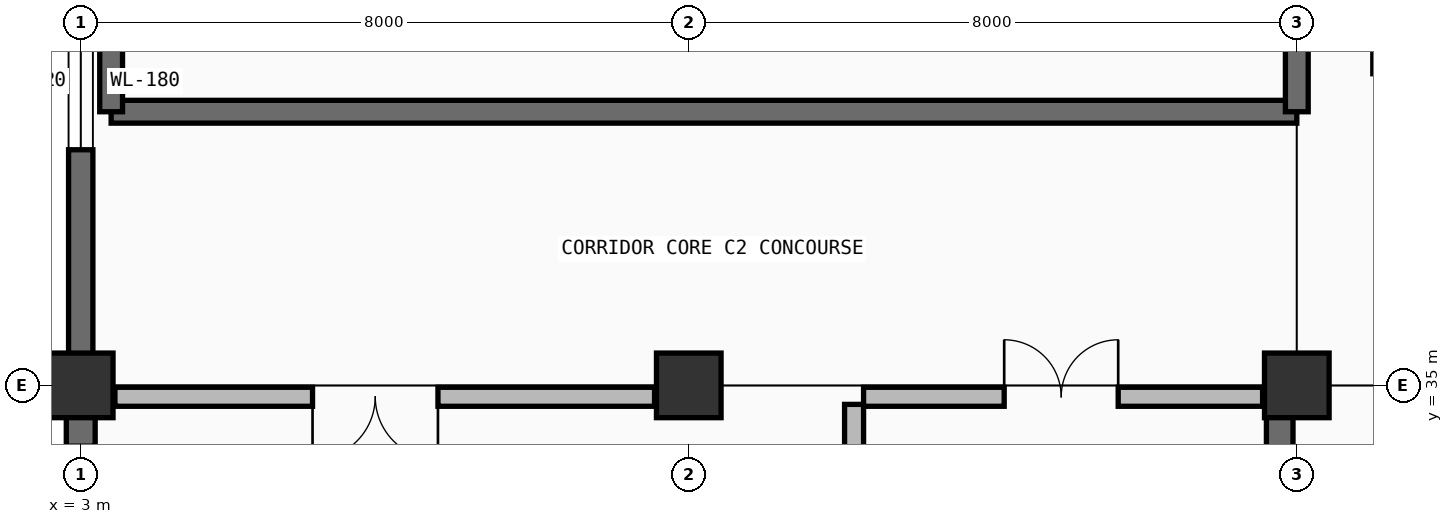
"""IFC4 building model, lengths in metres.
Left out: names, types, materials, properties, quantities, classifications, styles, units other than length and angle.
Written with IfcOpenShell. Run it as: python <this file> out.ifc"""

import sys

from ifc_helpers import new_model, si_unit, direction, frame, frame_2d, origin, origin_2d, place, context, subcontext, project, spatial, rectangle, extrude, element, fill, save


model = new_model("IFC4")
c1 = context("Model", 3, precision=1e-05, world=origin(), true_north=direction((0.0, 1.0)))
c2 = subcontext(c1, "Body", "Model", "MODEL_VIEW")
j1 = project(units=[si_unit("LENGTHUNIT", "METRE"), si_unit("PLANEANGLEUNIT", "RADIAN")], contexts=[c1])
p1 = place(None, origin())
s1 = spatial("IfcSite", under=j1, at=p1, CompositionType="ELEMENT")
p2 = place(p1, origin())
s2 = spatial("IfcBuilding", under=s1, at=p2, CompositionType="ELEMENT")
p3 = place(p2, origin())
s3 = spatial("IfcBuildingStorey", under=s2, at=p3, CompositionType="ELEMENT", Elevation=0.0)
for number, where, z_axis, x_axis in (
    (1, (3.0, 35.0, 0.0), (0.0, 0.0, 1.0), (1.0, 0.0, 0.0)),
    (2, (11.0, 35.0, 0.0), (0.0, 0.0, 1.0), (1.0, 0.0, 0.0)),
    (3, (19.0, 35.0, 0.0), (0.0, 0.0, 1.0), (1.0, 0.0, 0.0)),
):
    element("IfcColumn", number, at=place(p3, frame(where, z_axis=z_axis, x_axis=x_axis)), inside=s3, PredefinedType="COLUMN", context=c2, shape_type="SweptSolid", body=[
        extrude(rectangle(XDim=0.85, YDim=0.85, at=origin_2d()), origin(), (0.0, 0.0, 1.0), 5.4),
    ])
p4 = place(p3, frame((3.0, 27.0, 0.0), z_axis=(0.0, 0.0, 1.0), x_axis=(0.0, 1.0, 0.0)))
e4 = element("IfcWall", 4, at=p4, inside=s3, PredefinedType="SOLIDWALL", context=c2, shape_type="SweptSolid", body=[
    extrude(rectangle(XDim=8.0, YDim=0.38, at=frame_2d((4.0, 0.0))), origin(), (0.0, 0.0, 1.0), 5.4),
])
p5 = place(p4, frame((5.2, 0.0, 0.0)))
e5 = element("IfcOpeningElement", 5, at=p5, cuts=e4, PredefinedType="OPENING", context=c2, shape_type="SweptSolid", body=[
    extrude(rectangle(XDim=2.0, YDim=2.6, at=frame_2d((1.0, 1.3))), frame((0.0, 0.2, 0.0), z_axis=(0.0, -1.0, 0.0), x_axis=(1.0, 0.0, 0.0)), (0.0, 0.0, 1.0), 0.4),
])
p6 = place(p3, frame((3.0, 35.0, 0.0), z_axis=(0.0, 0.0, 1.0), x_axis=(0.0, 1.0, 0.0)))
e6 = element("IfcWall", 6, at=p6, inside=s3, PredefinedType="SOLIDWALL", context=c2, shape_type="SweptSolid", body=[
    extrude(rectangle(XDim=8.0, YDim=0.32, at=frame_2d((4.0, 0.0))), origin(), (0.0, 0.0, 1.0), 5.4),
])
p7 = place(p6, frame((3.1, 0.0, 1.1)))
e7 = element("IfcOpeningElement", 7, at=p7, cuts=e6, PredefinedType="OPENING", context=c2, shape_type="SweptSolid", body=[
    extrude(rectangle(XDim=1.8, YDim=0.85, at=frame_2d((0.9, 0.425))), frame((0.0, 0.17, 0.0), z_axis=(0.0, -1.0, 0.0), x_axis=(1.0, 0.0, 0.0)), (0.0, 0.0, 1.0), 0.34),
])
p8 = place(p3, frame((18.775, 27.2, 0.0), z_axis=(0.0, 0.0, 1.0), x_axis=(0.0, 1.0, 0.0)))
e8 = element("IfcWall", 8, at=p8, inside=s3, PredefinedType="SHEAR", context=c2, shape_type="SweptSolid", body=[
    extrude(rectangle(XDim=7.6, YDim=0.35, at=frame_2d((3.8, 0.0))), origin(), (0.0, 0.0, 1.0), 5.1),
])
p9 = place(p8, frame((5.1, 0.0, 0.0)))
e9 = element("IfcOpeningElement", 9, at=p9, cuts=e8, PredefinedType="OPENING", context=c2, shape_type="SweptSolid", body=[
    extrude(rectangle(XDim=1.5, YDim=2.2, at=frame_2d((0.75, 1.1))), frame((0.0, 0.185, 0.0), z_axis=(0.0, -1.0, 0.0), x_axis=(1.0, 0.0, 0.0)), (0.0, 0.0, 1.0), 0.37),
])
p10 = place(p3, frame((13.175, 31.775, 0.0), z_axis=(0.0, 0.0, 1.0), x_axis=(0.0, 1.0, 0.0)))
e10 = element("IfcWall", 10, at=p10, inside=s3, PredefinedType="PARTITIONING", context=c2, shape_type="SweptSolid", body=[
    extrude(rectangle(XDim=2.975, YDim=0.25, at=frame_2d((1.488, 0.0))), origin(), (0.0, 0.0, 1.0), 5.1),
])
p11 = place(p10, frame((0.45, 0.0, 0.0)))
e11 = element("IfcOpeningElement", 11, at=p11, cuts=e10, PredefinedType="OPENING", context=c2, shape_type="SweptSolid", body=[
    extrude(rectangle(XDim=1.2, YDim=2.2, at=frame_2d((0.6, 1.1))), frame((0.0, 0.135, 0.0), z_axis=(0.0, -1.0, 0.0), x_axis=(1.0, 0.0, 0.0)), (0.0, 0.0, 1.0), 0.27),
])
p12 = place(p3, frame((3.45, 34.85, 0.0), z_axis=(0.0, 0.0, 1.0), x_axis=(1.0, 0.0, 0.0)))
e12 = element("IfcWall", 12, at=p12, inside=s3, PredefinedType="PARTITIONING", context=c2, shape_type="SweptSolid", body=[
    extrude(rectangle(XDim=7.1, YDim=0.25, at=frame_2d((3.55, 0.0))), origin(), (0.0, 0.0, 1.0), 4.335),
])
p13 = place(p12, frame((2.6, 0.0, 0.0)))
e13 = element("IfcOpeningElement", 13, at=p13, cuts=e12, PredefinedType="OPENING", context=c2, shape_type="SweptSolid", body=[
    extrude(rectangle(XDim=1.65, YDim=2.25, at=frame_2d((0.825, 1.125))), frame((0.0, 0.135, 0.0), z_axis=(0.0, -1.0, 0.0), x_axis=(1.0, 0.0, 0.0)), (0.0, 0.0, 1.0), 0.27),
])
p14 = place(p3, frame((13.3, 34.85, 0.0), z_axis=(0.0, 0.0, 1.0), x_axis=(1.0, 0.0, 0.0)))
e14 = element("IfcWall", 14, at=p14, inside=s3, PredefinedType="PARTITIONING", context=c2, shape_type="SweptSolid", body=[
    extrude(rectangle(XDim=5.25, YDim=0.25, at=frame_2d((2.625, 0.0))), origin(), (0.0, 0.0, 1.0), 4.335),
])
p15 = place(p14, frame((1.85, 0.0, 0.0)))
e15 = element("IfcOpeningElement", 15, at=p15, cuts=e14, PredefinedType="OPENING", context=c2, shape_type="SweptSolid", body=[
    extrude(rectangle(XDim=1.5, YDim=2.2, at=frame_2d((0.75, 1.1))), frame((0.0, 0.135, 0.0), z_axis=(0.0, -1.0, 0.0), x_axis=(1.0, 0.0, 0.0)), (0.0, 0.0, 1.0), 0.27),
])
p16 = place(p3, frame((3.4, 38.6, 0.0), z_axis=(0.0, 0.0, 1.0), x_axis=(1.0, 0.0, 0.0)))
e16 = element("IfcWall", 16, at=p16, inside=s3, PredefinedType="SHEAR", context=c2, shape_type="SweptSolid", body=[
    extrude(rectangle(XDim=15.6, YDim=0.3, at=frame_2d((7.8, 0.0))), origin(), (0.0, 0.0, 1.0), 5.1),
])
p17 = place(p3, frame((19.0, 38.6, 0.0), z_axis=(0.0, 0.0, 1.0), x_axis=(0.0, 1.0, 0.0)))
e17 = element("IfcWall", 17, at=p17, inside=s3, PredefinedType="SHEAR", context=c2, shape_type="SweptSolid", body=[
    extrude(rectangle(XDim=25.0, YDim=0.3, at=frame_2d((12.5, 0.0))), origin(), (0.0, 0.0, 1.0), 5.1),
])
p18 = place(p17, frame((15.709, 0.0, 0.0)))
e18 = element("IfcOpeningElement", 18, at=p18, cuts=e17, PredefinedType="OPENING", context=c2, shape_type="SweptSolid", body=[
    extrude(rectangle(XDim=1.4, YDim=2.22, at=frame_2d((0.7, 1.11))), frame((0.0, 0.16, 0.0), z_axis=(0.0, -1.0, 0.0), x_axis=(1.0, 0.0, 0.0)), (0.0, 0.0, 1.0), 0.32),
])
p19 = place(p3, frame((3.4, 38.6, 0.0), z_axis=(0.0, 0.0, 1.0), x_axis=(0.0, 1.0, 0.0)))
e19 = element("IfcWall", 19, at=p19, inside=s3, PredefinedType="SHEAR", context=c2, shape_type="SweptSolid", body=[
    extrude(rectangle(XDim=25.0, YDim=0.3, at=frame_2d((12.5, 0.0))), origin(), (0.0, 0.0, 1.0), 5.1),
])
p20 = place(p7, origin())
e20 = element("IfcWindow", 20, at=p20, inside=s3, PartitioningType="SINGLE_PANEL", PredefinedType="WINDOW", context=c2, shape_type="SweptSolid", body=[
    extrude(rectangle(XDim=1.8, YDim=0.85, at=frame_2d((0.9, 0.425))), frame((0.0, 0.03, 0.0), z_axis=(0.0, -1.0, 0.0), x_axis=(1.0, 0.0, 0.0)), (0.0, 0.0, 1.0), 0.06),
])
fill(e7, e20)
p21 = place(p13, frame((1.65, 0.0, 0.0), z_axis=(0.0, 0.0, 1.0), x_axis=(-1.0, 0.0, 0.0)))
e21 = element("IfcDoor", 21, at=p21, inside=s3, OperationType="DOUBLE_DOOR_SINGLE_SWING", PredefinedType="DOOR", context=c2, shape_type="SweptSolid", body=[
    extrude(rectangle(XDim=1.65, YDim=2.25, at=frame_2d((0.825, 1.125))), frame((0.0, 0.025, 0.0), z_axis=(0.0, -1.0, 0.0), x_axis=(1.0, 0.0, 0.0)), (0.0, 0.0, 1.0), 0.05),
])
fill(e13, e21)
p22 = place(p15, origin())
e22 = element("IfcDoor", 22, at=p22, inside=s3, OperationType="DOUBLE_DOOR_SINGLE_SWING", PredefinedType="DOOR", context=c2, shape_type="SweptSolid", body=[
    extrude(rectangle(XDim=1.5, YDim=2.2, at=frame_2d((0.75, 1.1))), frame((0.0, 0.025, 0.0), z_axis=(0.0, -1.0, 0.0), x_axis=(1.0, 0.0, 0.0)), (0.0, 0.0, 1.0), 0.05),
])
fill(e15, e22)
save(model, sys.argv[1])
